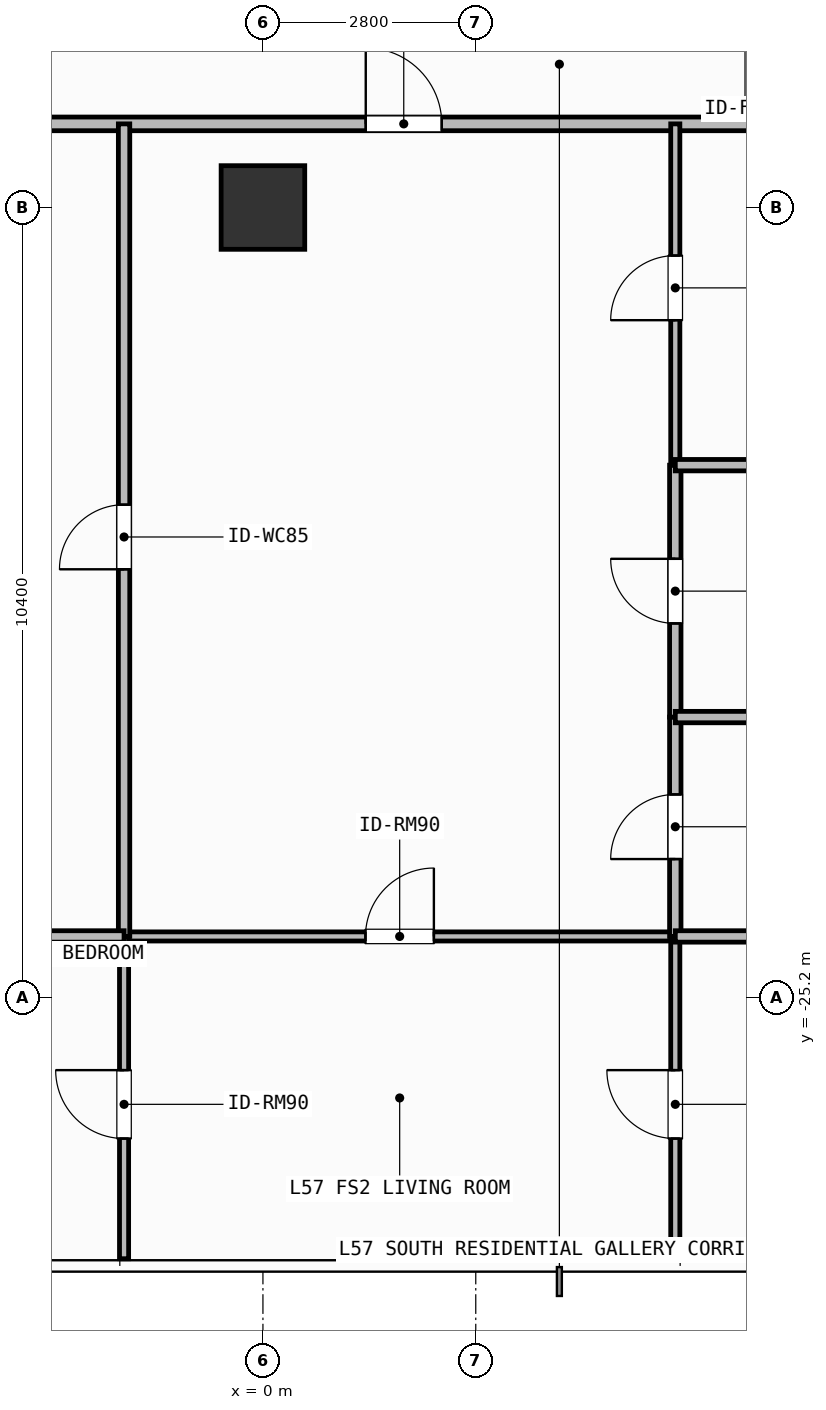
"""IFC4 building model, lengths in metres.
Left out: names, types, materials, properties, quantities, classifications, styles, units other than length and angle.
Written with IfcOpenShell. Run it as: python <this file> out.ifc"""

import sys

from ifc_helpers import new_model, si_unit, direction, frame, frame_2d, origin, origin_2d, place, context, subcontext, project, spatial, rectangle, extrude, element, fill, save


model = new_model("IFC4")
c1 = context("Model", 3, precision=1e-05, world=origin(), true_north=direction((0.0, 1.0)))
c2 = subcontext(c1, "Body", "Model", "MODEL_VIEW")
j1 = project(units=[si_unit("LENGTHUNIT", "METRE"), si_unit("PLANEANGLEUNIT", "RADIAN")], contexts=[c1])
p1 = place(None, origin())
s1 = spatial("IfcSite", under=j1, at=p1, CompositionType="ELEMENT")
p2 = place(p1, origin())
s2 = spatial("IfcBuilding", under=s1, at=p2, CompositionType="ELEMENT")
p3 = place(p2, frame((0.0, 0.0, 231.3)))
s3 = spatial("IfcBuildingStorey", under=s2, at=p3, CompositionType="ELEMENT", Elevation=231.3)
p4 = place(p3, frame((0.0, -14.8, 0.0), z_axis=(0.0, 0.0, 1.0), x_axis=(1.0, 0.0, 0.0)))
e1 = element("IfcColumn", 1, at=p4, inside=s3, PredefinedType="COLUMN", context=c2, shape_type="SweptSolid", body=[
    extrude(rectangle(XDim=1.1, YDim=1.1, at=origin_2d()), origin(), (0.0, 0.0, 1.0), 3.9),
])
p5 = place(p3, frame((-4.677, -13.7, 0.0), z_axis=(0.0, 0.0, 1.0), x_axis=(1.0, 0.0, 0.0)))
e2 = element("IfcWall", 2, at=p5, inside=s3, PredefinedType="PARTITIONING", context=c2, shape_type="SweptSolid", body=[
    extrude(rectangle(XDim=15.905, YDim=0.18, at=frame_2d((7.953, 0.0))), origin(), (0.0, 0.0, 1.0), 3.6),
])
p6 = place(p5, frame((6.03, 0.0, 0.0)))
e3 = element("IfcOpeningElement", 3, at=p6, cuts=e2, PredefinedType="OPENING", context=c2, shape_type="SweptSolid", body=[
    extrude(rectangle(XDim=1.0, YDim=2.2, at=frame_2d((0.5, 1.1))), frame((0.0, 0.1, 0.0), z_axis=(0.0, -1.0, 0.0), x_axis=(1.0, 0.0, 0.0)), (0.0, 0.0, 1.0), 0.2),
])
p7 = place(p3, frame((-1.827, -24.39, 0.0), z_axis=(0.0, 0.0, 1.0), x_axis=(1.0, 0.0, 0.0)))
e4 = element("IfcWall", 4, at=p7, inside=s3, PredefinedType="PARTITIONING", context=c2, shape_type="SweptSolid", body=[
    extrude(rectangle(XDim=7.252, YDim=0.12, at=frame_2d((3.626, 0.0))), origin(), (0.0, 0.0, 1.0), 3.6),
])
p8 = place(p7, frame((3.176, 0.0, 0.0)))
e5 = element("IfcOpeningElement", 5, at=p8, cuts=e4, PredefinedType="OPENING", context=c2, shape_type="SweptSolid", body=[
    extrude(rectangle(XDim=0.9, YDim=2.1, at=frame_2d((0.45, 1.05))), frame((0.0, 0.07, 0.0), z_axis=(0.0, -1.0, 0.0), x_axis=(1.0, 0.0, 0.0)), (0.0, 0.0, 1.0), 0.14),
])
p9 = place(p3, frame((-1.827, -24.39, 0.0), z_axis=(0.0, 0.0, 1.0), x_axis=(0.0, 1.0, 0.0)))
e6 = element("IfcWall", 6, at=p9, inside=s3, PredefinedType="PARTITIONING", context=c2, shape_type="SweptSolid", body=[
    extrude(rectangle(XDim=10.69, YDim=0.15, at=frame_2d((5.345, 0.0))), origin(), (0.0, 0.0, 1.0), 3.6),
])
p10 = place(p9, frame((4.83, 0.0, 0.0)))
e7 = element("IfcOpeningElement", 7, at=p10, cuts=e6, PredefinedType="OPENING", context=c2, shape_type="SweptSolid", body=[
    extrude(rectangle(XDim=0.85, YDim=2.1, at=frame_2d((0.425, 1.05))), frame((0.0, 0.085, 0.0), z_axis=(0.0, -1.0, 0.0), x_axis=(1.0, 0.0, 0.0)), (0.0, 0.0, 1.0), 0.17),
])
p11 = place(p3, frame((-1.827, -28.63, 0.0), z_axis=(0.0, 0.0, 1.0), x_axis=(0.0, 1.0, 0.0)))
e8 = element("IfcWall", 8, at=p11, inside=s3, PredefinedType="PARTITIONING", context=c2, shape_type="SweptSolid", body=[
    extrude(rectangle(XDim=4.24, YDim=0.12, at=frame_2d((2.12, 0.0))), origin(), (0.0, 0.0, 1.0), 3.6),
])
p12 = place(p11, frame((1.581, 0.0, 0.0)))
e9 = element("IfcOpeningElement", 9, at=p12, cuts=e8, PredefinedType="OPENING", context=c2, shape_type="SweptSolid", body=[
    extrude(rectangle(XDim=0.9, YDim=2.1, at=frame_2d((0.45, 1.05))), frame((0.0, 0.07, 0.0), z_axis=(0.0, -1.0, 0.0), x_axis=(1.0, 0.0, 0.0)), (0.0, 0.0, 1.0), 0.14),
])
p13 = place(p3, frame((5.425, -24.39, 0.0), z_axis=(0.0, 0.0, 1.0), x_axis=(0.0, 1.0, 0.0)))
e10 = element("IfcWall", 10, at=p13, inside=s3, PredefinedType="PARTITIONING", context=c2, shape_type="SweptSolid", body=[
    extrude(rectangle(XDim=2.886, YDim=0.15, at=frame_2d((1.443, 0.0))), origin(), (0.0, 0.0, 1.0), 3.6),
])
p14 = place(p13, frame((1.018, 0.0, 0.0)))
e11 = element("IfcOpeningElement", 11, at=p14, cuts=e10, PredefinedType="OPENING", context=c2, shape_type="SweptSolid", body=[
    extrude(rectangle(XDim=0.85, YDim=2.1, at=frame_2d((0.425, 1.05))), frame((0.0, 0.085, 0.0), z_axis=(0.0, -1.0, 0.0), x_axis=(1.0, 0.0, 0.0)), (0.0, 0.0, 1.0), 0.17),
])
p15 = place(p3, frame((5.425, -21.504, 0.0), z_axis=(0.0, 0.0, 1.0), x_axis=(0.0, 1.0, 0.0)))
e12 = element("IfcWall", 12, at=p15, inside=s3, PredefinedType="PARTITIONING", context=c2, shape_type="SweptSolid", body=[
    extrude(rectangle(XDim=3.314, YDim=0.15, at=frame_2d((1.657, 0.0))), origin(), (0.0, 0.0, 1.0), 3.6),
])
p16 = place(p15, frame((1.232, 0.0, 0.0)))
e13 = element("IfcOpeningElement", 13, at=p16, cuts=e12, PredefinedType="OPENING", context=c2, shape_type="SweptSolid", body=[
    extrude(rectangle(XDim=0.85, YDim=2.1, at=frame_2d((0.425, 1.05))), frame((0.0, 0.085, 0.0), z_axis=(0.0, -1.0, 0.0), x_axis=(1.0, 0.0, 0.0)), (0.0, 0.0, 1.0), 0.17),
])
p17 = place(p3, frame((5.425, -18.19, 0.0), z_axis=(0.0, 0.0, 1.0), x_axis=(0.0, 1.0, 0.0)))
e14 = element("IfcWall", 14, at=p17, inside=s3, PredefinedType="PARTITIONING", context=c2, shape_type="SweptSolid", body=[
    extrude(rectangle(XDim=4.49, YDim=0.12, at=frame_2d((2.245, 0.0))), origin(), (0.0, 0.0, 1.0), 3.6),
])
p18 = place(p17, frame((1.907, 0.0, 0.0)))
e15 = element("IfcOpeningElement", 15, at=p18, cuts=e14, PredefinedType="OPENING", context=c2, shape_type="SweptSolid", body=[
    extrude(rectangle(XDim=0.85, YDim=2.1, at=frame_2d((0.425, 1.05))), frame((0.0, 0.07, 0.0), z_axis=(0.0, -1.0, 0.0), x_axis=(1.0, 0.0, 0.0)), (0.0, 0.0, 1.0), 0.14),
])
p19 = place(p3, frame((5.425, -28.63, 0.0), z_axis=(0.0, 0.0, 1.0), x_axis=(0.0, 1.0, 0.0)))
e16 = element("IfcWall", 16, at=p19, inside=s3, PredefinedType="PARTITIONING", context=c2, shape_type="SweptSolid", body=[
    extrude(rectangle(XDim=4.24, YDim=0.12, at=frame_2d((2.12, 0.0))), origin(), (0.0, 0.0, 1.0), 3.6),
])
p20 = place(p19, frame((1.581, 0.0, 0.0)))
e17 = element("IfcOpeningElement", 17, at=p20, cuts=e16, PredefinedType="OPENING", context=c2, shape_type="SweptSolid", body=[
    extrude(rectangle(XDim=0.9, YDim=2.1, at=frame_2d((0.45, 1.05))), frame((0.0, 0.07, 0.0), z_axis=(0.0, -1.0, 0.0), x_axis=(1.0, 0.0, 0.0)), (0.0, 0.0, 1.0), 0.14),
])
p21 = place(p3, frame((-4.677, -24.39, 0.0), z_axis=(0.0, 0.0, 1.0), x_axis=(1.0, 0.0, 0.0)))
e18 = element("IfcWall", 18, at=p21, inside=s3, PredefinedType="PARTITIONING", context=c2, shape_type="SweptSolid", body=[
    extrude(rectangle(XDim=2.85, YDim=0.15, at=frame_2d((1.425, 0.0))), origin(), (0.0, 0.0, 1.0), 3.6),
])
for number, where, z_axis, x_axis in (
    (19, (5.425, -21.504, 0.0), (0.0, 0.0, 1.0), (1.0, 0.0, 0.0)),
    (20, (5.425, -18.19, 0.0), (0.0, 0.0, 1.0), (1.0, 0.0, 0.0)),
    (21, (5.425, -24.39, 0.0), (0.0, 0.0, 1.0), (1.0, 0.0, 0.0)),
):
    element("IfcWall", number, at=place(p3, frame(where, z_axis=z_axis, x_axis=x_axis)), inside=s3, PredefinedType="PARTITIONING", context=c2, shape_type="SweptSolid", body=[
        extrude(rectangle(XDim=5.803, YDim=0.15, at=frame_2d((2.901, 0.0))), origin(), (0.0, 0.0, 1.0), 3.6),
    ])
p22 = place(p6, origin())
e22 = element("IfcDoor", 22, at=p22, inside=s3, OperationType="SINGLE_SWING_LEFT", PredefinedType="DOOR", context=c2, shape_type="SweptSolid", body=[
    extrude(rectangle(XDim=1.0, YDim=2.2, at=frame_2d((0.5, 1.1))), frame((0.0, 0.025, 0.0), z_axis=(0.0, -1.0, 0.0), x_axis=(1.0, 0.0, 0.0)), (0.0, 0.0, 1.0), 0.05),
])
fill(e3, e22)
p23 = place(p8, origin())
e23 = element("IfcDoor", 23, at=p23, inside=s3, OperationType="SINGLE_SWING_RIGHT", PredefinedType="DOOR", context=c2, shape_type="SweptSolid", body=[
    extrude(rectangle(XDim=0.9, YDim=2.1, at=frame_2d((0.45, 1.05))), frame((0.0, 0.025, 0.0), z_axis=(0.0, -1.0, 0.0), x_axis=(1.0, 0.0, 0.0)), (0.0, 0.0, 1.0), 0.05),
])
fill(e5, e23)
p24 = place(p10, origin())
e24 = element("IfcDoor", 24, at=p24, inside=s3, OperationType="SINGLE_SWING_LEFT", PredefinedType="DOOR", context=c2, shape_type="SweptSolid", body=[
    extrude(rectangle(XDim=0.85, YDim=2.1, at=frame_2d((0.425, 1.05))), frame((0.0, 0.025, 0.0), z_axis=(0.0, -1.0, 0.0), x_axis=(1.0, 0.0, 0.0)), (0.0, 0.0, 1.0), 0.05),
])
fill(e7, e24)
p25 = place(p12, origin())
e25 = element("IfcDoor", 25, at=p25, inside=s3, OperationType="SINGLE_SWING_RIGHT", PredefinedType="DOOR", context=c2, shape_type="SweptSolid", body=[
    extrude(rectangle(XDim=0.9, YDim=2.1, at=frame_2d((0.45, 1.05))), frame((0.0, 0.025, 0.0), z_axis=(0.0, -1.0, 0.0), x_axis=(1.0, 0.0, 0.0)), (0.0, 0.0, 1.0), 0.05),
])
fill(e9, e25)
p26 = place(p14, origin())
e26 = element("IfcDoor", 26, at=p26, inside=s3, OperationType="SINGLE_SWING_LEFT", PredefinedType="DOOR", context=c2, shape_type="SweptSolid", body=[
    extrude(rectangle(XDim=0.85, YDim=2.1, at=frame_2d((0.425, 1.05))), frame((0.0, 0.025, 0.0), z_axis=(0.0, -1.0, 0.0), x_axis=(1.0, 0.0, 0.0)), (0.0, 0.0, 1.0), 0.05),
])
fill(e11, e26)
p27 = place(p16, origin())
e27 = element("IfcDoor", 27, at=p27, inside=s3, OperationType="SINGLE_SWING_RIGHT", PredefinedType="DOOR", context=c2, shape_type="SweptSolid", body=[
    extrude(rectangle(XDim=0.85, YDim=2.1, at=frame_2d((0.425, 1.05))), frame((0.0, 0.025, 0.0), z_axis=(0.0, -1.0, 0.0), x_axis=(1.0, 0.0, 0.0)), (0.0, 0.0, 1.0), 0.05),
])
fill(e13, e27)
p28 = place(p18, origin())
e28 = element("IfcDoor", 28, at=p28, inside=s3, OperationType="SINGLE_SWING_LEFT", PredefinedType="DOOR", context=c2, shape_type="SweptSolid", body=[
    extrude(rectangle(XDim=0.85, YDim=2.1, at=frame_2d((0.425, 1.05))), frame((0.0, 0.025, 0.0), z_axis=(0.0, -1.0, 0.0), x_axis=(1.0, 0.0, 0.0)), (0.0, 0.0, 1.0), 0.05),
])
fill(e15, e28)
p29 = place(p20, origin())
e29 = element("IfcDoor", 29, at=p29, inside=s3, OperationType="SINGLE_SWING_RIGHT", PredefinedType="DOOR", context=c2, shape_type="SweptSolid", body=[
    extrude(rectangle(XDim=0.9, YDim=2.1, at=frame_2d((0.45, 1.05))), frame((0.0, 0.025, 0.0), z_axis=(0.0, -1.0, 0.0), x_axis=(1.0, 0.0, 0.0)), (0.0, 0.0, 1.0), 0.05),
])
fill(e17, e29)
save(model, sys.argv[1])
